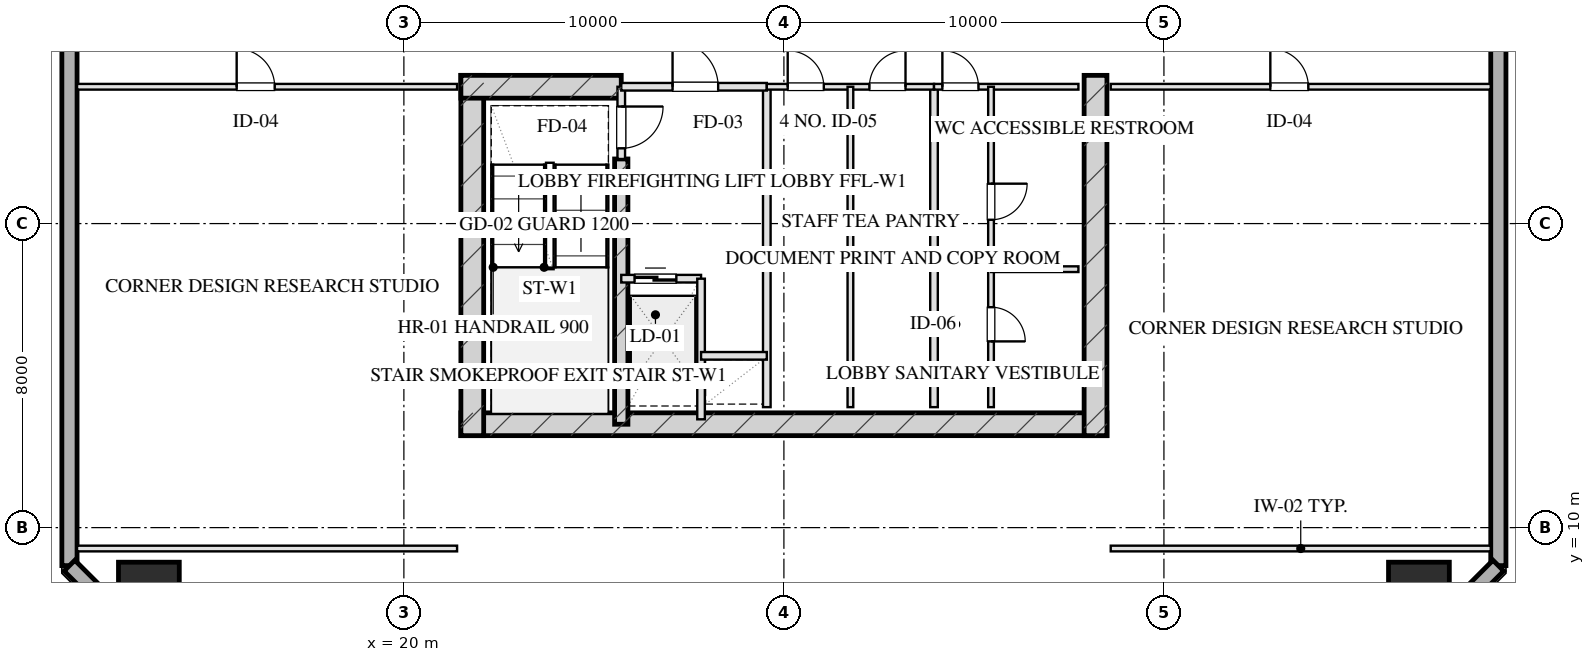
"""IFC4 building model, lengths in metres.
Left out: names, types, materials, properties, quantities, classifications, styles, units other than length and angle.
Written with IfcOpenShell. Run it as: python <this file> out.ifc"""

import sys

from ifc_helpers import new_model, si_unit, direction, frame, frame_2d, origin, origin_2d, place, context, subcontext, project, spatial, rectangle, hollow_rectangle, extrude, element, fill, save


model = new_model("IFC4")
c1 = context("Model", 3, precision=1e-05, world=origin(), true_north=direction((0.0, 1.0)))
c2 = subcontext(c1, "Body", "Model", "MODEL_VIEW")
j1 = project(units=[si_unit("LENGTHUNIT", "METRE"), si_unit("PLANEANGLEUNIT", "RADIAN")], contexts=[c1])
p1 = place(None, origin())
s1 = spatial("IfcSite", under=j1, at=p1, CompositionType="ELEMENT")
p2 = place(p1, origin())
s2 = spatial("IfcBuilding", under=s1, at=p2, CompositionType="ELEMENT")
p3 = place(p2, frame((0.0, 0.0, 131.1)))
s3 = spatial("IfcBuildingStorey", under=s2, at=p3, CompositionType="ELEMENT", Elevation=131.1)
p4 = place(p3, frame((21.5, 12.72, 0.0), z_axis=(0.0, 0.0, 1.0), x_axis=(1.0, 0.0, 0.0)))
e1 = element("IfcWall", 1, at=p4, inside=s3, PredefinedType="SHEAR", context=c2, shape_type="SweptSolid", body=[
    extrude(rectangle(XDim=17.0, YDim=0.6, at=frame_2d((8.5, 0.0))), origin(), (0.0, 0.0, 1.0), 3.45),
])
for number, where, z_axis, x_axis in (
    (2, (21.8, 21.9, 0.0), (0.0, 0.0, 1.0), (0.0, -1.0, 0.0)),
    (3, (38.2, 21.9, 0.0), (0.0, 0.0, 1.0), (0.0, -1.0, 0.0)),
):
    element("IfcWall", number, at=place(p3, frame(where, z_axis=z_axis, x_axis=x_axis)), inside=s3, PredefinedType="SHEAR", context=c2, shape_type="SweptSolid", body=[
        extrude(rectangle(XDim=9.48, YDim=0.6, at=frame_2d((4.74, 0.0))), origin(), (0.0, 0.0, 1.0), 3.45),
    ])
p5 = place(p3, frame((25.72, 19.7, 0.0), z_axis=(0.0, 0.0, 1.0), x_axis=(0.0, -1.0, 0.0)))
e4 = element("IfcWall", 4, at=p5, inside=s3, PredefinedType="SHEAR", context=c2, shape_type="SweptSolid", body=[
    extrude(rectangle(XDim=6.98, YDim=0.35, at=frame_2d((3.49, 0.0))), origin(), (0.0, 0.0, 1.0), 3.45),
])
p6 = place(p3, frame((21.5, 21.6, 0.0), z_axis=(0.0, 0.0, 1.0), x_axis=(1.0, 0.0, 0.0)))
e5 = element("IfcWall", 5, at=p6, inside=s3, PredefinedType="SHEAR", context=c2, shape_type="SweptSolid", body=[
    extrude(rectangle(XDim=4.22, YDim=0.6, at=frame_2d((2.11, 0.0))), origin(), (0.0, 0.0, 1.0), 3.45),
])
for number, where, z_axis, x_axis in (
    (6, (13.29, 8.29, 0.0), (0.0, 0.0, 1.0), (1.0, 0.0, 0.0)),
    (7, (46.71, 8.29, 0.0), (0.0, 0.0, 1.0), (1.0, 0.0, 0.0)),
):
    element("IfcColumn", number, at=place(p3, frame(where, z_axis=z_axis, x_axis=x_axis)), inside=s3, PredefinedType="COLUMN", context=c2, shape_type="SweptSolid", body=[
        extrude(hollow_rectangle(XDim=1.6, YDim=1.6, WallThickness=0.055, at=origin_2d()), origin(), (0.0, 0.0, 1.0), 3.451),
    ])
p7 = place(p3, frame((11.2, 9.0, 0.0), z_axis=(0.0, 0.0, 1.0), x_axis=(0.0, 1.0, 0.0)))
e8 = element("IfcWall", 8, at=p7, inside=s3, PredefinedType="SOLIDWALL", context=c2, shape_type="SweptSolid", body=[
    extrude(rectangle(XDim=50.0, YDim=0.4, at=frame_2d((25.0, 0.0))), origin(), (0.0, 0.0, 1.0), 2.61),
])
p8 = place(p7, frame((26.475, 0.0, 0.75)))
e9 = element("IfcOpeningElement", 9, at=p8, cuts=e8, PredefinedType="OPENING", context=c2, shape_type="SweptSolid", body=[
    extrude(rectangle(XDim=2.25, YDim=1.46, at=frame_2d((1.125, 0.73))), frame((0.0, 0.21, 0.0), z_axis=(0.0, -1.0, 0.0), x_axis=(1.0, 0.0, 0.0)), (0.0, 0.0, 1.0), 0.42),
])
p9 = place(p7, frame((30.275, 0.0, 0.75)))
e10 = element("IfcOpeningElement", 10, at=p9, cuts=e8, PredefinedType="OPENING", context=c2, shape_type="SweptSolid", body=[
    extrude(rectangle(XDim=2.25, YDim=1.46, at=frame_2d((1.125, 0.73))), frame((0.0, 0.21, 0.0), z_axis=(0.0, -1.0, 0.0), x_axis=(1.0, 0.0, 0.0)), (0.0, 0.0, 1.0), 0.42),
])
p10 = place(p7, frame((20.05, 0.0, 0.0)))
e11 = element("IfcOpeningElement", 11, at=p10, cuts=e8, PredefinedType="OPENING", context=c2, shape_type="SweptSolid", body=[
    extrude(rectangle(XDim=1.1, YDim=2.15, at=frame_2d((0.55, 1.075))), frame((0.0, 0.21, 0.0), z_axis=(0.0, -1.0, 0.0), x_axis=(1.0, 0.0, 0.0)), (0.0, 0.0, 1.0), 0.42),
])
p11 = place(p3, frame((48.8, 59.0, 0.0), z_axis=(0.0, 0.0, 1.0), x_axis=(0.0, -1.0, 0.0)))
e12 = element("IfcWall", 12, at=p11, inside=s3, PredefinedType="SOLIDWALL", context=c2, shape_type="SweptSolid", body=[
    extrude(rectangle(XDim=50.0, YDim=0.4, at=frame_2d((25.0, 0.0))), origin(), (0.0, 0.0, 1.0), 2.61),
])
p12 = place(p11, frame((21.275, 0.0, 0.75)))
e13 = element("IfcOpeningElement", 13, at=p12, cuts=e12, PredefinedType="OPENING", context=c2, shape_type="SweptSolid", body=[
    extrude(rectangle(XDim=2.25, YDim=1.46, at=frame_2d((1.125, 0.73))), frame((0.0, 0.21, 0.0), z_axis=(0.0, -1.0, 0.0), x_axis=(1.0, 0.0, 0.0)), (0.0, 0.0, 1.0), 0.42),
])
p13 = place(p11, frame((17.475, 0.0, 0.75)))
e14 = element("IfcOpeningElement", 14, at=p13, cuts=e12, PredefinedType="OPENING", context=c2, shape_type="SweptSolid", body=[
    extrude(rectangle(XDim=2.25, YDim=1.46, at=frame_2d((1.125, 0.73))), frame((0.0, 0.21, 0.0), z_axis=(0.0, -1.0, 0.0), x_axis=(1.0, 0.0, 0.0)), (0.0, 0.0, 1.0), 0.42),
])
p14 = place(p11, frame((30.25, 0.0, 0.0)))
e15 = element("IfcOpeningElement", 15, at=p14, cuts=e12, PredefinedType="OPENING", context=c2, shape_type="SweptSolid", body=[
    extrude(rectangle(XDim=1.1, YDim=2.15, at=frame_2d((0.55, 1.075))), frame((0.0, 0.21, 0.0), z_axis=(0.0, -1.0, 0.0), x_axis=(1.0, 0.0, 0.0)), (0.0, 0.0, 1.0), 0.42),
])
for number, where, z_axis, x_axis in (
    (16, (48.8, 9.0, 0.0), (0.0, 0.0, 1.0), (-0.707, -0.707, 0.0)),
    (17, (14.0, 6.2, 0.0), (0.0, 0.0, 1.0), (-0.707, 0.707, 0.0)),
):
    element("IfcWall", number, at=place(p3, frame(where, z_axis=z_axis, x_axis=x_axis)), inside=s3, PredefinedType="SOLIDWALL", context=c2, shape_type="SweptSolid", body=[
        extrude(rectangle(XDim=3.96, YDim=0.4, at=frame_2d((1.98, 0.0))), origin(), (0.0, 0.0, 1.0), 2.61),
    ])
p15 = place(p3, frame((25.72, 21.6, 0.0), z_axis=(0.0, 0.0, 1.0), x_axis=(0.0, -1.0, 0.0)))
e18 = element("IfcWall", 18, at=p15, inside=s3, PredefinedType="PARTITIONING", context=c2, shape_type="SweptSolid", body=[
    extrude(rectangle(XDim=1.9, YDim=0.2, at=frame_2d((0.95, 0.0))), origin(), (0.0, 0.0, 1.0), 3.175),
])
p16 = place(p15, frame((0.52, 0.0, 0.0)))
e19 = element("IfcOpeningElement", 19, at=p16, cuts=e18, PredefinedType="OPENING", context=c2, shape_type="SweptSolid", body=[
    extrude(rectangle(XDim=1.1, YDim=2.05, at=frame_2d((0.55, 1.025))), frame((0.0, 0.11, 0.0), z_axis=(0.0, -1.0, 0.0), x_axis=(1.0, 0.0, 0.0)), (0.0, 0.0, 1.0), 0.22),
])
p17 = place(p3, frame((29.55, 21.6, 0.0), z_axis=(0.0, 0.0, 1.0), x_axis=(0.0, -1.0, 0.0)))
e20 = element("IfcWall", 20, at=p17, inside=s3, PredefinedType="PARTITIONING", context=c2, shape_type="SweptSolid", body=[
    extrude(rectangle(XDim=8.43, YDim=0.2, at=frame_2d((4.215, 0.0))), origin(), (0.0, 0.0, 1.0), 3.175),
])
p18 = place(p3, frame((25.72, 21.6, 0.0), z_axis=(0.0, 0.0, 1.0), x_axis=(1.0, 0.0, 0.0)))
e21 = element("IfcWall", 21, at=p18, inside=s3, PredefinedType="PARTITIONING", context=c2, shape_type="SweptSolid", body=[
    extrude(rectangle(XDim=3.83, YDim=0.2, at=frame_2d((1.915, 0.0))), origin(), (0.0, 0.0, 1.0), 3.175),
])
p19 = place(p18, frame((1.35, 0.0, 0.0)))
e22 = element("IfcOpeningElement", 22, at=p19, cuts=e21, PredefinedType="OPENING", context=c2, shape_type="SweptSolid", body=[
    extrude(rectangle(XDim=1.2, YDim=2.05, at=frame_2d((0.6, 1.025))), frame((0.0, 0.11, 0.0), z_axis=(0.0, -1.0, 0.0), x_axis=(1.0, 0.0, 0.0)), (0.0, 0.0, 1.0), 0.22),
])
p20 = place(p3, frame((25.72, 16.55, 0.0), z_axis=(0.0, 0.0, 1.0), x_axis=(1.0, 0.0, 0.0)))
e23 = element("IfcWall", 23, at=p20, inside=s3, PredefinedType="PARTITIONING", context=c2, shape_type="SweptSolid", body=[
    extrude(rectangle(XDim=2.1, YDim=0.2, at=frame_2d((1.05, 0.0))), origin(), (0.0, 0.0, 1.0), 3.175),
])
p21 = place(p20, frame((0.35, 0.0, 0.0)))
e24 = element("IfcOpeningElement", 24, at=p21, cuts=e23, PredefinedType="OPENING", context=c2, shape_type="SweptSolid", body=[
    extrude(rectangle(XDim=1.1, YDim=2.05, at=frame_2d((0.55, 1.025))), frame((0.0, 0.11, 0.0), z_axis=(0.0, -1.0, 0.0), x_axis=(1.0, 0.0, 0.0)), (0.0, 0.0, 1.0), 0.22),
])
p22 = place(p3, frame((27.82, 16.55, 0.0), z_axis=(0.0, 0.0, 1.0), x_axis=(0.0, -1.0, 0.0)))
e25 = element("IfcWall", 25, at=p22, inside=s3, PredefinedType="PARTITIONING", context=c2, shape_type="SweptSolid", body=[
    extrude(rectangle(XDim=3.7, YDim=0.2, at=frame_2d((1.85, 0.0))), origin(), (0.0, 0.0, 1.0), 3.175),
])
p23 = place(p3, frame((27.82, 14.52, 0.0), z_axis=(0.0, 0.0, 1.0), x_axis=(1.0, 0.0, 0.0)))
e26 = element("IfcWall", 26, at=p23, inside=s3, PredefinedType="PARTITIONING", context=c2, shape_type="SweptSolid", body=[
    extrude(rectangle(XDim=1.73, YDim=0.2, at=frame_2d((0.865, 0.0))), origin(), (0.0, 0.0, 1.0), 3.175),
])
p24 = place(p3, frame((33.95, 21.6, 0.0), z_axis=(0.0, 0.0, 1.0), x_axis=(0.0, -1.0, 0.0)))
e27 = element("IfcWall", 27, at=p24, inside=s3, PredefinedType="PARTITIONING", context=c2, shape_type="SweptSolid", body=[
    extrude(rectangle(XDim=8.43, YDim=0.2, at=frame_2d((4.215, 0.0))), origin(), (0.0, 0.0, 1.0), 3.175),
])
p25 = place(p3, frame((29.55, 21.6, 0.0), z_axis=(0.0, 0.0, 1.0), x_axis=(1.0, 0.0, 0.0)))
e28 = element("IfcWall", 28, at=p25, inside=s3, PredefinedType="PARTITIONING", context=c2, shape_type="SweptSolid", body=[
    extrude(rectangle(XDim=4.4, YDim=0.15, at=frame_2d((2.2, 0.0))), origin(), (0.0, 0.0, 1.0), 3.175),
])
p26 = place(p25, frame((0.55, 0.0, 0.0)))
e29 = element("IfcOpeningElement", 29, at=p26, cuts=e28, PredefinedType="OPENING", context=c2, shape_type="SweptSolid", body=[
    extrude(rectangle(XDim=0.95, YDim=2.05, at=frame_2d((0.475, 1.025))), frame((0.0, 0.085, 0.0), z_axis=(0.0, -1.0, 0.0), x_axis=(1.0, 0.0, 0.0)), (0.0, 0.0, 1.0), 0.17),
])
p27 = place(p25, frame((2.7, 0.0, 0.0)))
e30 = element("IfcOpeningElement", 30, at=p27, cuts=e28, PredefinedType="OPENING", context=c2, shape_type="SweptSolid", body=[
    extrude(rectangle(XDim=0.95, YDim=2.05, at=frame_2d((0.475, 1.025))), frame((0.0, 0.085, 0.0), z_axis=(0.0, -1.0, 0.0), x_axis=(1.0, 0.0, 0.0)), (0.0, 0.0, 1.0), 0.17),
])
p28 = place(p3, frame((31.75, 21.6, 0.0), z_axis=(0.0, 0.0, 1.0), x_axis=(0.0, -1.0, 0.0)))
e31 = element("IfcWall", 31, at=p28, inside=s3, PredefinedType="PARTITIONING", context=c2, shape_type="SweptSolid", body=[
    extrude(rectangle(XDim=8.43, YDim=0.15, at=frame_2d((4.215, 0.0))), origin(), (0.0, 0.0, 1.0), 3.175),
])
p29 = place(p3, frame((33.95, 21.6, 0.0), z_axis=(0.0, 0.0, 1.0), x_axis=(1.0, 0.0, 0.0)))
e32 = element("IfcWall", 32, at=p29, inside=s3, PredefinedType="PARTITIONING", context=c2, shape_type="SweptSolid", body=[
    extrude(rectangle(XDim=3.8, YDim=0.15, at=frame_2d((1.9, 0.0))), origin(), (0.0, 0.0, 1.0), 3.175),
])
p30 = place(p29, frame((0.22, 0.0, 0.0)))
e33 = element("IfcOpeningElement", 33, at=p30, cuts=e32, PredefinedType="OPENING", context=c2, shape_type="SweptSolid", body=[
    extrude(rectangle(XDim=0.95, YDim=2.05, at=frame_2d((0.475, 1.025))), frame((0.0, 0.085, 0.0), z_axis=(0.0, -1.0, 0.0), x_axis=(1.0, 0.0, 0.0)), (0.0, 0.0, 1.0), 0.17),
])
p31 = place(p3, frame((35.45, 21.6, 0.0), z_axis=(0.0, 0.0, 1.0), x_axis=(0.0, -1.0, 0.0)))
e34 = element("IfcWall", 34, at=p31, inside=s3, PredefinedType="PARTITIONING", context=c2, shape_type="SweptSolid", body=[
    extrude(rectangle(XDim=8.43, YDim=0.15, at=frame_2d((4.215, 0.0))), origin(), (0.0, 0.0, 1.0), 2.765),
])
p32 = place(p31, frame((2.55, 0.0, 0.0)))
e35 = element("IfcOpeningElement", 35, at=p32, cuts=e34, PredefinedType="OPENING", context=c2, shape_type="SweptSolid", body=[
    extrude(rectangle(XDim=0.95, YDim=2.05, at=frame_2d((0.475, 1.025))), frame((0.0, 0.085, 0.0), z_axis=(0.0, -1.0, 0.0), x_axis=(1.0, 0.0, 0.0)), (0.0, 0.0, 1.0), 0.17),
])
p33 = place(p31, frame((5.8, 0.0, 0.0)))
e36 = element("IfcOpeningElement", 36, at=p33, cuts=e34, PredefinedType="OPENING", context=c2, shape_type="SweptSolid", body=[
    extrude(rectangle(XDim=0.9, YDim=2.05, at=frame_2d((0.45, 1.025))), frame((0.0, 0.085, 0.0), z_axis=(0.0, -1.0, 0.0), x_axis=(1.0, 0.0, 0.0)), (0.0, 0.0, 1.0), 0.17),
])
p34 = place(p3, frame((35.45, 16.8, 0.0), z_axis=(0.0, 0.0, 1.0), x_axis=(1.0, 0.0, 0.0)))
e37 = element("IfcWall", 37, at=p34, inside=s3, PredefinedType="PARTITIONING", context=c2, shape_type="SweptSolid", body=[
    extrude(rectangle(XDim=2.3, YDim=0.15, at=frame_2d((1.15, 0.0))), origin(), (0.0, 0.0, 1.0), 3.175),
])
p35 = place(p3, frame((11.4, 9.45, 0.0), z_axis=(0.0, 0.0, 1.0), x_axis=(1.0, 0.0, 0.0)))
e38 = element("IfcWall", 38, at=p35, inside=s3, PredefinedType="PARTITIONING", context=c2, shape_type="SweptSolid", body=[
    extrude(rectangle(XDim=10.0, YDim=0.15, at=frame_2d((5.0, 0.0))), origin(), (0.0, 0.0, 1.0), 3.175),
])
p36 = place(p3, frame((11.4, 21.6, 0.0), z_axis=(0.0, 0.0, 1.0), x_axis=(1.0, 0.0, 0.0)))
e39 = element("IfcWall", 39, at=p36, inside=s3, PredefinedType="PARTITIONING", context=c2, shape_type="SweptSolid", body=[
    extrude(rectangle(XDim=10.0, YDim=0.15, at=frame_2d((5.0, 0.0))), origin(), (0.0, 0.0, 1.0), 3.175),
])
p37 = place(p36, frame((4.2, 0.0, 0.0)))
e40 = element("IfcOpeningElement", 40, at=p37, cuts=e39, PredefinedType="OPENING", context=c2, shape_type="SweptSolid", body=[
    extrude(rectangle(XDim=1.0, YDim=2.05, at=frame_2d((0.5, 1.025))), frame((0.0, 0.085, 0.0), z_axis=(0.0, -1.0, 0.0), x_axis=(1.0, 0.0, 0.0)), (0.0, 0.0, 1.0), 0.17),
])
p38 = place(p3, frame((38.6, 9.45, 0.0), z_axis=(0.0, 0.0, 1.0), x_axis=(1.0, 0.0, 0.0)))
e41 = element("IfcWall", 41, at=p38, inside=s3, PredefinedType="PARTITIONING", context=c2, shape_type="SweptSolid", body=[
    extrude(rectangle(XDim=10.0, YDim=0.15, at=frame_2d((5.0, 0.0))), origin(), (0.0, 0.0, 1.0), 3.175),
])
p39 = place(p3, frame((38.6, 21.6, 0.0), z_axis=(0.0, 0.0, 1.0), x_axis=(1.0, 0.0, 0.0)))
e42 = element("IfcWall", 42, at=p39, inside=s3, PredefinedType="PARTITIONING", context=c2, shape_type="SweptSolid", body=[
    extrude(rectangle(XDim=10.0, YDim=0.15, at=frame_2d((5.0, 0.0))), origin(), (0.0, 0.0, 1.0), 3.175),
])
p40 = place(p39, frame((4.2, 0.0, 0.0)))
e43 = element("IfcOpeningElement", 43, at=p40, cuts=e42, PredefinedType="OPENING", context=c2, shape_type="SweptSolid", body=[
    extrude(rectangle(XDim=1.0, YDim=2.05, at=frame_2d((0.5, 1.025))), frame((0.0, 0.085, 0.0), z_axis=(0.0, -1.0, 0.0), x_axis=(1.0, 0.0, 0.0)), (0.0, 0.0, 1.0), 0.17),
])
p41 = place(p16, origin())
e44 = element("IfcDoor", 44, at=p41, inside=s3, OperationType="SINGLE_SWING_LEFT", PredefinedType="DOOR", context=c2, shape_type="SweptSolid", body=[
    extrude(rectangle(XDim=1.1, YDim=2.05, at=frame_2d((0.55, 1.025))), frame((0.0, 0.025, 0.0), z_axis=(0.0, -1.0, 0.0), x_axis=(1.0, 0.0, 0.0)), (0.0, 0.0, 1.0), 0.05),
])
fill(e19, e44)
p42 = place(p19, origin())
e45 = element("IfcDoor", 45, at=p42, inside=s3, OperationType="SINGLE_SWING_LEFT", PredefinedType="DOOR", context=c2, shape_type="SweptSolid", body=[
    extrude(rectangle(XDim=1.2, YDim=2.05, at=frame_2d((0.6, 1.025))), frame((0.0, 0.025, 0.0), z_axis=(0.0, -1.0, 0.0), x_axis=(1.0, 0.0, 0.0)), (0.0, 0.0, 1.0), 0.05),
])
fill(e22, e45)
p43 = place(p21, origin())
e46 = element("IfcDoor", 46, at=p43, inside=s3, OperationType="DOUBLE_DOOR_SLIDING", PredefinedType="DOOR", context=c2, shape_type="SweptSolid", body=[
    extrude(rectangle(XDim=1.1, YDim=2.05, at=frame_2d((0.55, 1.025))), frame((0.0, 0.025, 0.0), z_axis=(0.0, -1.0, 0.0), x_axis=(1.0, 0.0, 0.0)), (0.0, 0.0, 1.0), 0.05),
])
fill(e24, e46)
p44 = place(p26, origin())
e47 = element("IfcDoor", 47, at=p44, inside=s3, OperationType="SINGLE_SWING_LEFT", PredefinedType="DOOR", context=c2, shape_type="SweptSolid", body=[
    extrude(rectangle(XDim=0.95, YDim=2.05, at=frame_2d((0.475, 1.025))), frame((0.0, 0.025, 0.0), z_axis=(0.0, -1.0, 0.0), x_axis=(1.0, 0.0, 0.0)), (0.0, 0.0, 1.0), 0.05),
])
fill(e29, e47)
p45 = place(p27, origin())
e48 = element("IfcDoor", 48, at=p45, inside=s3, OperationType="SINGLE_SWING_RIGHT", PredefinedType="DOOR", context=c2, shape_type="SweptSolid", body=[
    extrude(rectangle(XDim=0.95, YDim=2.05, at=frame_2d((0.475, 1.025))), frame((0.0, 0.025, 0.0), z_axis=(0.0, -1.0, 0.0), x_axis=(1.0, 0.0, 0.0)), (0.0, 0.0, 1.0), 0.05),
])
fill(e30, e48)
p46 = place(p30, origin())
e49 = element("IfcDoor", 49, at=p46, inside=s3, OperationType="SINGLE_SWING_LEFT", PredefinedType="DOOR", context=c2, shape_type="SweptSolid", body=[
    extrude(rectangle(XDim=0.95, YDim=2.05, at=frame_2d((0.475, 1.025))), frame((0.0, 0.025, 0.0), z_axis=(0.0, -1.0, 0.0), x_axis=(1.0, 0.0, 0.0)), (0.0, 0.0, 1.0), 0.05),
])
fill(e33, e49)
p47 = place(p32, origin())
e50 = element("IfcDoor", 50, at=p47, inside=s3, OperationType="SINGLE_SWING_LEFT", PredefinedType="DOOR", context=c2, shape_type="SweptSolid", body=[
    extrude(rectangle(XDim=0.95, YDim=2.05, at=frame_2d((0.475, 1.025))), frame((0.0, 0.025, 0.0), z_axis=(0.0, -1.0, 0.0), x_axis=(1.0, 0.0, 0.0)), (0.0, 0.0, 1.0), 0.05),
])
fill(e35, e50)
p48 = place(p33, origin())
e51 = element("IfcDoor", 51, at=p48, inside=s3, OperationType="SINGLE_SWING_RIGHT", PredefinedType="DOOR", context=c2, shape_type="SweptSolid", body=[
    extrude(rectangle(XDim=0.9, YDim=2.05, at=frame_2d((0.45, 1.025))), frame((0.0, 0.025, 0.0), z_axis=(0.0, -1.0, 0.0), x_axis=(1.0, 0.0, 0.0)), (0.0, 0.0, 1.0), 0.05),
])
fill(e36, e51)
p49 = place(p37, origin())
e52 = element("IfcDoor", 52, at=p49, inside=s3, OperationType="SINGLE_SWING_LEFT", PredefinedType="DOOR", context=c2, shape_type="SweptSolid", body=[
    extrude(rectangle(XDim=1.0, YDim=2.05, at=frame_2d((0.5, 1.025))), frame((0.0, 0.025, 0.0), z_axis=(0.0, -1.0, 0.0), x_axis=(1.0, 0.0, 0.0)), (0.0, 0.0, 1.0), 0.05),
])
fill(e40, e52)
p50 = place(p40, origin())
e53 = element("IfcDoor", 53, at=p50, inside=s3, OperationType="SINGLE_SWING_LEFT", PredefinedType="DOOR", context=c2, shape_type="SweptSolid", body=[
    extrude(rectangle(XDim=1.0, YDim=2.05, at=frame_2d((0.5, 1.025))), frame((0.0, 0.025, 0.0), z_axis=(0.0, -1.0, 0.0), x_axis=(1.0, 0.0, 0.0)), (0.0, 0.0, 1.0), 0.05),
])
fill(e43, e53)
save(model, sys.argv[1])
